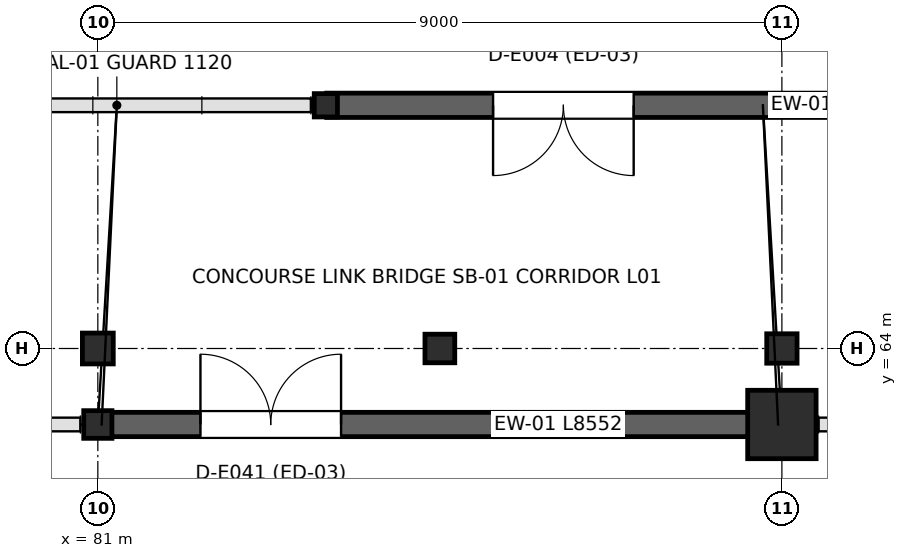
"""IFC4 building model, lengths in metres.
Left out: names, types, materials, properties, quantities, classifications, styles, units other than length and angle.
Written with IfcOpenShell. Run it as: python <this file> out.ifc"""

import sys

from ifc_helpers import new_model, si_unit, direction, frame, frame_2d, origin, origin_2d, place, context, subcontext, project, spatial, rectangle, hollow_rectangle, circle, i_section, extrude, element, fill, save


model = new_model("IFC4")
c1 = context("Model", 3, precision=1e-05, world=origin(), true_north=direction((0.0, 1.0)))
c2 = subcontext(c1, "Body", "Model", "MODEL_VIEW")
j1 = project(units=[si_unit("LENGTHUNIT", "METRE"), si_unit("PLANEANGLEUNIT", "RADIAN")], contexts=[c1])
p1 = place(None, origin())
s1 = spatial("IfcSite", under=j1, at=p1, CompositionType="ELEMENT")
p2 = place(p1, origin())
s2 = spatial("IfcBuilding", under=s1, at=p2, CompositionType="ELEMENT")
p3 = place(p2, frame((0.0, 0.0, 6.0)))
s3 = spatial("IfcBuildingStorey", under=s2, at=p3, CompositionType="ELEMENT", Elevation=6.0)
p4 = place(p3, frame((81.0, 64.0, 0.0), z_axis=(0.0, 0.0, 1.0), x_axis=(1.0, 0.0, 0.0)))
e1 = element("IfcColumn", 1, at=p4, inside=s3, PredefinedType="PILASTER", context=c2, shape_type="SweptSolid", body=[
    extrude(hollow_rectangle(XDim=0.406, YDim=0.406, WallThickness=0.015, at=origin_2d()), origin(), (0.0, 0.0, 1.0), 6.0),
])
p5 = place(p3, frame((85.5, 64.0, 0.0), z_axis=(0.0, 0.0, 1.0), x_axis=(1.0, 0.0, 0.0)))
e2 = element("IfcColumn", 2, at=p5, inside=s3, PredefinedType="COLUMN", context=c2, shape_type="SweptSolid", body=[
    extrude(i_section(OverallWidth=0.392, OverallDepth=0.376, WebThickness=0.017, FlangeThickness=0.028, at=origin_2d()), origin(), (0.0, 0.0, 1.0), 6.0),
])
p6 = place(p3, frame((90.0, 64.0, 0.0), z_axis=(0.0, 0.0, 1.0), x_axis=(1.0, 0.0, 0.0)))
e3 = element("IfcColumn", 3, at=p6, inside=s3, PredefinedType="COLUMN", context=c2, shape_type="SweptSolid", body=[
    extrude(i_section(OverallWidth=0.399, OverallDepth=0.387, WebThickness=0.021, FlangeThickness=0.033, at=origin_2d()), origin(), (0.0, 0.0, 1.0), 6.0),
])
p7 = place(p3, frame((84.0, 67.2, 0.0), z_axis=(0.0, 0.0, 1.0), x_axis=(1.0, 0.0, 0.0)))
e4 = element("IfcColumn", 4, at=p7, inside=s3, PredefinedType="COLUMN", context=c2, shape_type="SweptSolid", body=[
    extrude(i_section(OverallWidth=0.305, OverallDepth=0.307, WebThickness=0.01, FlangeThickness=0.015, at=origin_2d()), origin(), (0.0, 0.0, 1.0), 6.0),
])
p8 = place(p3, frame((81.0, 63.0, 0.0), z_axis=(0.0, 0.0, 1.0), x_axis=(1.0, 0.0, 0.0)))
e5 = element("IfcColumn", 5, at=p8, inside=s3, PredefinedType="COLUMN", context=c2, shape_type="SweptSolid", body=[
    extrude(i_section(OverallWidth=0.371, OverallDepth=0.364, WebThickness=0.013, FlangeThickness=0.022, at=origin_2d()), origin(), (0.0, 0.0, 1.0), 6.0),
])
p9 = place(p3, frame((90.0, 63.0, 0.0), z_axis=(0.0, 0.0, 1.0), x_axis=(1.0, 0.0, 0.0)))
e6 = element("IfcColumn", 6, at=p9, inside=s3, PredefinedType="COLUMN", context=c2, shape_type="SweptSolid", body=[
    extrude(circle(Radius=0.45, at=origin_2d()), origin(), (0.0, 0.0, 1.0), 6.0),
])
p10 = place(p3, frame((92.988, 67.2, 0.0), z_axis=(0.0, 0.0, 1.0), x_axis=(-1.0, 0.0, 0.0)))
e7 = element("IfcWall", 7, at=p10, inside=s3, PredefinedType="STANDARD", context=c2, shape_type="SweptSolid", body=[
    extrude(rectangle(XDim=8.976, YDim=0.32, at=frame_2d((4.488, 0.0))), origin(), (0.0, 0.0, 1.0), 5.78),
])
p11 = place(p10, frame((4.938, 0.0, 0.0)))
e8 = element("IfcOpeningElement", 8, at=p11, cuts=e7, PredefinedType="OPENING", context=c2, shape_type="SweptSolid", body=[
    extrude(rectangle(XDim=1.85, YDim=2.35, at=frame_2d((0.925, 1.175))), frame((0.0, 0.17, 0.0), z_axis=(0.0, -1.0, 0.0), x_axis=(1.0, 0.0, 0.0)), (0.0, 0.0, 1.0), 0.34),
])
p12 = place(p3, frame((81.013, 63.0, 0.0), z_axis=(0.0, 0.0, 1.0), x_axis=(1.0, 0.0, 0.0)))
e9 = element("IfcWall", 9, at=p12, inside=s3, PredefinedType="STANDARD", context=c2, shape_type="SweptSolid", body=[
    extrude(rectangle(XDim=8.552, YDim=0.32, at=frame_2d((4.276, 0.0))), origin(), (0.0, 0.0, 1.0), 5.78),
])
p13 = place(p12, frame((1.337, 0.0, 0.0)))
e10 = element("IfcOpeningElement", 10, at=p13, cuts=e9, PredefinedType="OPENING", context=c2, shape_type="SweptSolid", body=[
    extrude(rectangle(XDim=1.85, YDim=2.35, at=frame_2d((0.925, 1.175))), frame((0.0, 0.17, 0.0), z_axis=(0.0, -1.0, 0.0), x_axis=(1.0, 0.0, 0.0)), (0.0, 0.0, 1.0), 0.34),
])
p14 = place(p11, origin())
e11 = element("IfcDoor", 11, at=p14, inside=s3, OperationType="DOUBLE_DOOR_SINGLE_SWING", PredefinedType="DOOR", context=c2, shape_type="SweptSolid", body=[
    extrude(rectangle(XDim=1.85, YDim=2.35, at=frame_2d((0.925, 1.175))), frame((0.0, 0.025, 0.0), z_axis=(0.0, -1.0, 0.0), x_axis=(1.0, 0.0, 0.0)), (0.0, 0.0, 1.0), 0.05),
])
fill(e8, e11)
p15 = place(p13, origin())
e12 = element("IfcDoor", 12, at=p15, inside=s3, OperationType="DOUBLE_DOOR_SINGLE_SWING", PredefinedType="DOOR", context=c2, shape_type="SweptSolid", body=[
    extrude(rectangle(XDim=1.85, YDim=2.35, at=frame_2d((0.925, 1.175))), frame((0.0, 0.025, 0.0), z_axis=(0.0, -1.0, 0.0), x_axis=(1.0, 0.0, 0.0)), (0.0, 0.0, 1.0), 0.05),
])
fill(e10, e12)
save(model, sys.argv[1])
